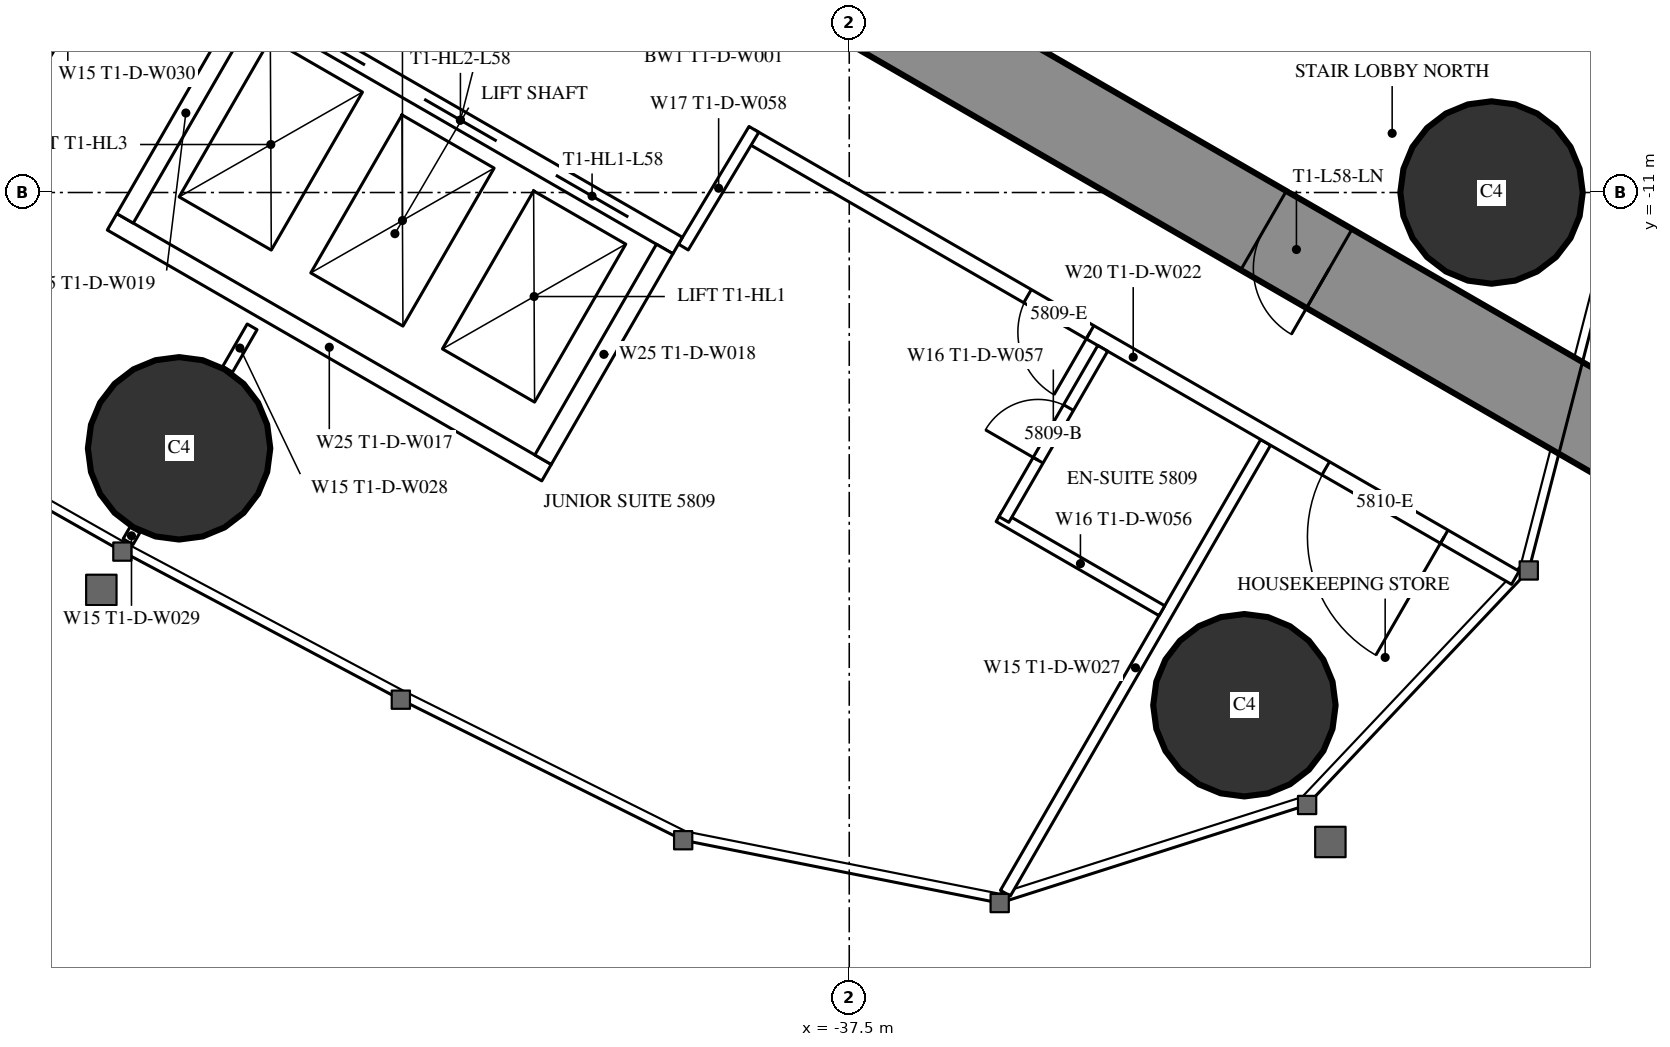
"""IFC4 building model, lengths in metres.
Left out: names, types, materials, properties, quantities, classifications, styles, units other than length and angle.
Written with IfcOpenShell. Run it as: python <this file> out.ifc"""

import sys

from ifc_helpers import new_model, si_unit, direction, frame, frame_2d, origin, origin_2d, place, context, subcontext, project, spatial, rectangle, circle, extrude, element, fill, save


model = new_model("IFC4")
c1 = context("Model", 3, precision=1e-05, world=origin(), true_north=direction((0.0, 1.0)))
c2 = subcontext(c1, "Body", "Model", "MODEL_VIEW")
j1 = project(units=[si_unit("LENGTHUNIT", "METRE"), si_unit("PLANEANGLEUNIT", "RADIAN")], contexts=[c1])
p1 = place(None, origin())
s1 = spatial("IfcSite", under=j1, at=p1, CompositionType="ELEMENT")
p2 = place(p1, origin())
s2 = spatial("IfcBuilding", under=s1, at=p2, CompositionType="ELEMENT")
p3 = place(p2, frame((0.0, 0.0, 218.9)))
s3 = spatial("IfcBuildingStorey", under=s2, at=p3, CompositionType="ELEMENT", Elevation=218.9)
for number, where, z_axis, x_axis in (
    (1, (-32.301, -17.745, 0.0), (0.0, 0.0, 1.0), (1.0, 0.0, 0.0)),
    (2, (-29.05, -11.0, 0.0), (0.0, 0.0, 1.0), (1.0, 0.0, 0.0)),
    (3, (-46.317, -14.365, 0.0), (0.0, 0.0, 1.0), (1.0, 0.0, 0.0)),
):
    element("IfcColumn", number, at=place(p3, frame(where, z_axis=z_axis, x_axis=x_axis)), inside=s3, PredefinedType="COLUMN", context=c2, shape_type="SweptSolid", body=[
        extrude(circle(Radius=1.2, at=origin_2d()), origin(), (0.0, 0.0, 1.0), 3.6),
    ])
p4 = place(p3, frame((-27.2, -14.3, 0.0), z_axis=(0.0, 0.0, 1.0), x_axis=(-0.866024021859, 0.500002393557, 0.0)))
e4 = element("IfcWall", 4, at=p4, inside=s3, PredefinedType="SHEAR", context=c2, shape_type="SweptSolid", body=[
    extrude(rectangle(XDim=27.907, YDim=1.2, at=frame_2d((13.954, 0.0))), origin(), (0.0, 0.0, 1.0), 3.6),
])
p5 = place(p4, frame((4.6, 0.0, 0.0)))
e5 = element("IfcOpeningElement", 5, at=p5, cuts=e4, PredefinedType="OPENING", context=c2, shape_type="SweptSolid", body=[
    extrude(rectangle(XDim=1.0, YDim=2.2, at=frame_2d((0.5, 1.1))), frame((0.0, 0.61, 0.0), z_axis=(0.0, -1.0, 0.0), x_axis=(1.0, 0.0, 0.0)), (0.0, 0.0, 1.0), 1.22),
])
p6 = place(p4, frame((13.395, 0.0, 0.0)))
e6 = element("IfcOpeningElement", 6, at=p6, cuts=e4, PredefinedType="OPENING", context=c2, shape_type="SweptSolid", body=[
    extrude(rectangle(XDim=1.8, YDim=2.2, at=frame_2d((0.9, 1.1))), frame((0.0, 0.61, 0.0), z_axis=(0.0, -1.0, 0.0), x_axis=(1.0, 0.0, 0.0)), (0.0, 0.0, 1.0), 1.22),
])
p7 = place(p3, frame((-32.022, -14.287, 0.0), z_axis=(0.0, 0.0, 1.0), x_axis=(-0.50000019414, -0.866025291697, 0.0)))
e7 = element("IfcWall", 7, at=p7, inside=s3, PredefinedType="PARTITIONING", context=c2, shape_type="SweptSolid", body=[
    extrude(rectangle(XDim=6.848, YDim=0.15, at=frame_2d((3.424, 0.0))), origin(), (0.0, 0.0, 1.0), 3.35),
])
p8 = place(p3, frame((-46.898, -15.439, 0.0), z_axis=(0.0, 0.0, 1.0), x_axis=(-0.500232303069, -0.865891241997, 0.0)))
e8 = element("IfcWall", 8, at=p8, inside=s3, PredefinedType="PARTITIONING", context=c2, shape_type="SweptSolid", body=[
    extrude(rectangle(XDim=0.18, YDim=0.15, at=frame_2d((0.09, 0.0))), origin(), (0.0, 0.0, 1.0), 2.45),
])
p9 = place(p3, frame((-46.274, -6.059, 0.0), z_axis=(0.0, 0.0, 1.0), x_axis=(-0.500020471368, -0.866013584312, 0.0)))
e9 = element("IfcWall", 9, at=p9, inside=s3, PredefinedType="PARTITIONING", context=c2, shape_type="SweptSolid", body=[
    extrude(rectangle(XDim=6.028, YDim=0.15, at=frame_2d((3.014, 0.0))), origin(), (0.0, 0.0, 1.0), 2.45),
])
p10 = place(p3, frame((-45.356, -12.767, 0.0), z_axis=(0.0, 0.0, 1.0), x_axis=(-0.499886366516, -0.866091000168, 0.0)))
e10 = element("IfcWall", 10, at=p10, inside=s3, PredefinedType="PARTITIONING", context=c2, shape_type="SweptSolid", body=[
    extrude(rectangle(XDim=0.645, YDim=0.15, at=frame_2d((0.322, 0.0))), origin(), (0.0, 0.0, 1.0), 3.35),
])
p11 = place(p3, frame((-28.737, -16.068, 0.0), z_axis=(0.0, 0.0, 1.0), x_axis=(-0.866029399323, 0.49999307946, 0.0)))
e11 = element("IfcWall", 11, at=p11, inside=s3, PredefinedType="PARTITIONING", context=c2, shape_type="SweptSolid", body=[
    extrude(rectangle(XDim=11.61, YDim=0.2, at=frame_2d((5.805, 0.0))), origin(), (0.0, 0.0, 1.0), 3.35),
])
p12 = place(p11, frame((1.08, 0.0, 0.0)))
e12 = element("IfcOpeningElement", 12, at=p12, cuts=e11, PredefinedType="OPENING", context=c2, shape_type="SweptSolid", body=[
    extrude(rectangle(XDim=1.8, YDim=2.03, at=frame_2d((0.9, 1.015))), frame((0.0, 0.11, 0.0), z_axis=(0.0, -1.0, 0.0), x_axis=(1.0, 0.0, 0.0)), (0.0, 0.0, 1.0), 0.22),
])
p13 = place(p11, frame((6.46, 0.0, 0.0)))
e13 = element("IfcOpeningElement", 13, at=p13, cuts=e11, PredefinedType="OPENING", context=c2, shape_type="SweptSolid", body=[
    extrude(rectangle(XDim=0.95, YDim=2.2, at=frame_2d((0.475, 1.1))), frame((0.0, 0.11, 0.0), z_axis=(0.0, -1.0, 0.0), x_axis=(1.0, 0.0, 0.0)), (0.0, 0.0, 1.0), 0.22),
])
p14 = place(p3, frame((-39.683, -11.718, 0.0), z_axis=(0.0, 0.0, 1.0), x_axis=(0.514336634837, 0.857588377991, 0.0)))
e14 = element("IfcWall", 14, at=p14, inside=s3, PredefinedType="PARTITIONING", context=c2, shape_type="SweptSolid", body=[
    extrude(rectangle(XDim=1.805, YDim=0.15, at=frame_2d((0.903, 0.0))), origin(), (0.0, 0.0, 1.0), 3.35),
])
p15 = place(p3, frame((-33.387, -16.502, 0.0), z_axis=(0.0, 0.0, 1.0), x_axis=(-0.866006523861, 0.500032699561, 0.0)))
e15 = element("IfcWall", 15, at=p15, inside=s3, PredefinedType="PARTITIONING", context=c2, shape_type="SweptSolid", body=[
    extrude(rectangle(XDim=2.475, YDim=0.15, at=frame_2d((1.237, 0.0))), origin(), (0.0, 0.0, 1.0), 3.35),
])
p16 = place(p3, frame((-34.165, -13.05, 0.0), z_axis=(0.0, 0.0, 1.0), x_axis=(-0.500047596559, -0.865997922154, 0.0)))
e16 = element("IfcWall", 16, at=p16, inside=s3, PredefinedType="PARTITIONING", context=c2, shape_type="SweptSolid", body=[
    extrude(rectangle(XDim=2.6, YDim=0.15, at=frame_2d((1.3, 0.0))), origin(), (0.0, 0.0, 1.0), 3.35),
])
p17 = place(p16, frame((0.9, 0.0, 0.0)))
e17 = element("IfcOpeningElement", 17, at=p17, cuts=e16, PredefinedType="OPENING", context=c2, shape_type="SweptSolid", body=[
    extrude(rectangle(XDim=0.8, YDim=2.2, at=frame_2d((0.4, 1.1))), frame((0.0, 0.085, 0.0), z_axis=(0.0, -1.0, 0.0), x_axis=(1.0, 0.0, 0.0)), (0.0, 0.0, 1.0), 0.17),
])
p18 = place(p3, frame((-39.758, -11.697, 0.0), z_axis=(0.0, 0.0, 1.0), x_axis=(-0.866024194504, 0.500002094529, 0.0)))
e18 = element("IfcWall", 18, at=p18, inside=s3, PredefinedType="PARTITIONING", context=c2, shape_type="SweptSolid", body=[
    extrude(rectangle(XDim=6.6, YDim=0.25, at=frame_2d((3.3, 0.0))), origin(), (0.0, 0.0, 1.0), 3.35),
])
p19 = place(p18, frame((0.75, 0.0, 0.0)))
e19 = element("IfcOpeningElement", 19, at=p19, cuts=e18, PredefinedType="OPENING", context=c2, shape_type="SweptSolid", body=[
    extrude(rectangle(XDim=1.1, YDim=2.2, at=frame_2d((0.55, 1.1))), frame((0.0, 0.135, 0.0), z_axis=(0.0, -1.0, 0.0), x_axis=(1.0, 0.0, 0.0)), (0.0, 0.0, 1.0), 0.27),
])
p20 = place(p18, frame((2.75, 0.0, 0.0)))
e20 = element("IfcOpeningElement", 20, at=p20, cuts=e18, PredefinedType="OPENING", context=c2, shape_type="SweptSolid", body=[
    extrude(rectangle(XDim=1.1, YDim=2.2, at=frame_2d((0.55, 1.1))), frame((0.0, 0.135, 0.0), z_axis=(0.0, -1.0, 0.0), x_axis=(1.0, 0.0, 0.0)), (0.0, 0.0, 1.0), 0.27),
])
p21 = place(p18, frame((4.75, 0.0, 0.0)))
e21 = element("IfcOpeningElement", 21, at=p21, cuts=e18, PredefinedType="OPENING", context=c2, shape_type="SweptSolid", body=[
    extrude(rectangle(XDim=1.1, YDim=2.2, at=frame_2d((0.55, 1.1))), frame((0.0, 0.135, 0.0), z_axis=(0.0, -1.0, 0.0), x_axis=(1.0, 0.0, 0.0)), (0.0, 0.0, 1.0), 0.27),
])
p22 = place(p3, frame((-41.482, -14.686, 0.0), z_axis=(0.0, 0.0, 1.0), x_axis=(-0.86603344179, 0.499986077507, 0.0)))
e22 = element("IfcWall", 22, at=p22, inside=s3, PredefinedType="PARTITIONING", context=c2, shape_type="SweptSolid", body=[
    extrude(rectangle(XDim=6.6, YDim=0.25, at=frame_2d((3.3, 0.0))), origin(), (0.0, 0.0, 1.0), 3.35),
])
for number, where, z_axis, x_axis in (
    (23, (-39.928, -11.743, 0.0), (0.0, 0.0, 1.0), (-0.5, -0.866, 0.0)),
    (24, (-45.428, -8.568, 0.0), (0.0, 0.0, 1.0), (-0.5, -0.866, 0.0)),
):
    element("IfcWall", number, at=place(p3, frame(where, z_axis=z_axis, x_axis=x_axis)), inside=s3, PredefinedType="PARTITIONING", context=c2, shape_type="SweptSolid", body=[
        extrude(rectangle(XDim=3.201, YDim=0.25, at=frame_2d((1.6, 0.0))), origin(), (0.0, 0.0, 1.0), 3.35),
    ])
p23 = place(p12, origin())
e25 = element("IfcDoor", 25, at=p23, inside=s3, OperationType="DOUBLE_DOOR_SINGLE_SWING", PredefinedType="DOOR", context=c2, shape_type="SweptSolid", body=[
    extrude(rectangle(XDim=1.8, YDim=2.03, at=frame_2d((0.9, 1.015))), frame((0.0, 0.025, 0.0), z_axis=(0.0, -1.0, 0.0), x_axis=(1.0, 0.0, 0.0)), (0.0, 0.0, 1.0), 0.05),
])
fill(e12, e25)
p24 = place(p17, origin())
e26 = element("IfcDoor", 26, at=p24, inside=s3, OperationType="SINGLE_SWING_RIGHT", PredefinedType="DOOR", context=c2, shape_type="SweptSolid", body=[
    extrude(rectangle(XDim=0.8, YDim=2.2, at=frame_2d((0.4, 1.1))), frame((0.0, 0.025, 0.0), z_axis=(0.0, -1.0, 0.0), x_axis=(1.0, 0.0, 0.0)), (0.0, 0.0, 1.0), 0.05),
])
fill(e17, e26)
p25 = place(p13, origin())
e27 = element("IfcDoor", 27, at=p25, inside=s3, OperationType="SINGLE_SWING_LEFT", PredefinedType="DOOR", context=c2, shape_type="SweptSolid", body=[
    extrude(rectangle(XDim=0.95, YDim=2.2, at=frame_2d((0.475, 1.1))), frame((0.0, 0.025, 0.0), z_axis=(0.0, -1.0, 0.0), x_axis=(1.0, 0.0, 0.0)), (0.0, 0.0, 1.0), 0.05),
])
fill(e13, e27)
p26 = place(p5, origin())
e28 = element("IfcDoor", 28, at=p26, inside=s3, OperationType="SINGLE_SWING_LEFT", PredefinedType="DOOR", context=c2, shape_type="SweptSolid", body=[
    extrude(rectangle(XDim=1.0, YDim=2.2, at=frame_2d((0.5, 1.1))), frame((0.0, 0.025, 0.0), z_axis=(0.0, -1.0, 0.0), x_axis=(1.0, 0.0, 0.0)), (0.0, 0.0, 1.0), 0.05),
])
fill(e5, e28)
p27 = place(p19, origin())
e29 = element("IfcDoor", 29, at=p27, inside=s3, OperationType="DOUBLE_DOOR_SLIDING", PredefinedType="USERDEFINED", context=c2, shape_type="SweptSolid", body=[
    extrude(rectangle(XDim=1.1, YDim=2.2, at=frame_2d((0.55, 1.1))), frame((0.0, 0.025, 0.0), z_axis=(0.0, -1.0, 0.0), x_axis=(1.0, 0.0, 0.0)), (0.0, 0.0, 1.0), 0.05),
])
fill(e19, e29)
p28 = place(p20, origin())
e30 = element("IfcDoor", 30, at=p28, inside=s3, OperationType="DOUBLE_DOOR_SLIDING", PredefinedType="USERDEFINED", context=c2, shape_type="SweptSolid", body=[
    extrude(rectangle(XDim=1.1, YDim=2.2, at=frame_2d((0.55, 1.1))), frame((0.0, 0.025, 0.0), z_axis=(0.0, -1.0, 0.0), x_axis=(1.0, 0.0, 0.0)), (0.0, 0.0, 1.0), 0.05),
])
fill(e20, e30)
p29 = place(p21, origin())
e31 = element("IfcDoor", 31, at=p29, inside=s3, OperationType="DOUBLE_DOOR_SLIDING", PredefinedType="USERDEFINED", context=c2, shape_type="SweptSolid", body=[
    extrude(rectangle(XDim=1.1, YDim=2.2, at=frame_2d((0.55, 1.1))), frame((0.0, 0.025, 0.0), z_axis=(0.0, -1.0, 0.0), x_axis=(1.0, 0.0, 0.0)), (0.0, 0.0, 1.0), 0.05),
])
fill(e21, e31)
save(model, sys.argv[1])
